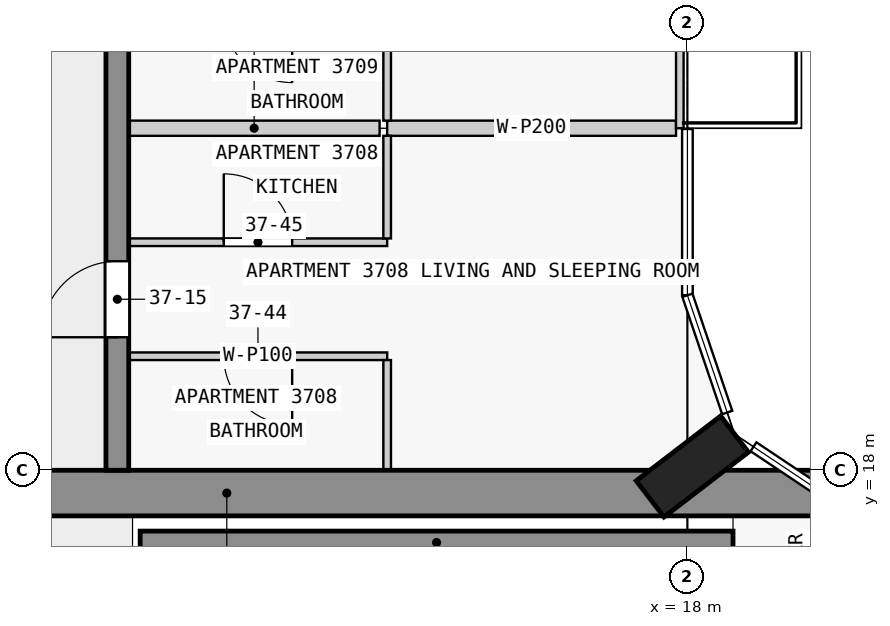
"""IFC4 building model, lengths in metres.
Left out: names, types, materials, properties, quantities, classifications, styles, units other than length and angle.
Written with IfcOpenShell. Run it as: python <this file> out.ifc"""

import sys

from ifc_helpers import new_model, si_unit, direction, frame, frame_2d, origin, origin_2d, place, context, subcontext, project, spatial, rectangle, extrude, element, fill, save


model = new_model("IFC4")
c1 = context("Model", 3, precision=1e-05, world=origin(), true_north=direction((0.0, 1.0)))
c2 = subcontext(c1, "Body", "Model", "MODEL_VIEW")
j1 = project(units=[si_unit("LENGTHUNIT", "METRE"), si_unit("PLANEANGLEUNIT", "RADIAN")], contexts=[c1])
p1 = place(None, origin())
s1 = spatial("IfcSite", under=j1, at=p1, CompositionType="ELEMENT")
p2 = place(p1, origin())
s2 = spatial("IfcBuilding", under=s1, at=p2, CompositionType="ELEMENT")
p3 = place(p2, frame((0.0, 0.0, 146.4)))
s3 = spatial("IfcBuildingStorey", under=s2, at=p3, CompositionType="ELEMENT", Elevation=146.4)
p4 = place(p3, frame((18.065, 18.05, 0.0), z_axis=(0.0, 0.0, 1.0), x_axis=(-0.608810846443, 0.793315418515, 0.0)))
e1 = element("IfcColumn", 1, at=p4, inside=s3, PredefinedType="COLUMN", context=c2, shape_type="SweptSolid", body=[
    extrude(rectangle(XDim=0.6, YDim=1.4, at=origin_2d()), origin(), (0.0, 0.0, 1.0), 3.5),
])
p5 = place(p3, frame((1.38, 17.7, 0.0), z_axis=(0.0, 0.0, 1.0), x_axis=(1.0, 0.0, 0.0)))
e2 = element("IfcWall", 2, at=p5, inside=s3, PredefinedType="SHEAR", context=c2, shape_type="SweptSolid", body=[
    extrude(rectangle(XDim=21.12, YDim=0.6, at=frame_2d((10.56, 0.0))), origin(), (0.0, 0.0, 1.0), 3.25),
])
p6 = place(p5, frame((6.4, 0.0, 0.0)))
e3 = element("IfcOpeningElement", 3, at=p6, cuts=e2, PredefinedType="OPENING", context=c2, shape_type="SweptSolid", body=[
    extrude(rectangle(XDim=1.8, YDim=2.1, at=frame_2d((0.9, 1.05))), frame((0.0, 0.31, 0.0), z_axis=(0.0, -1.0, 0.0), x_axis=(1.0, 0.0, 0.0)), (0.0, 0.0, 1.0), 0.62),
])
p7 = place(p3, frame((10.8, 17.05, 0.0), z_axis=(0.0, 0.0, 1.0), x_axis=(1.0, 0.0, 0.0)))
e4 = element("IfcWall", 4, at=p7, inside=s3, PredefinedType="SHEAR", context=c2, shape_type="SweptSolid", body=[
    extrude(rectangle(XDim=7.8, YDim=0.3, at=frame_2d((3.9, 0.0))), origin(), (0.0, 0.0, 1.0), 3.25),
])
p8 = place(p3, frame((10.5, 18.0, 0.0), z_axis=(0.0, 0.0, 1.0), x_axis=(0.0, 1.0, 0.0)))
e5 = element("IfcWall", 5, at=p8, inside=s3, PredefinedType="SHEAR", context=c2, shape_type="SweptSolid", body=[
    extrude(rectangle(XDim=27.0, YDim=0.3, at=frame_2d((13.5, 0.0))), origin(), (0.0, 0.0, 1.0), 3.25),
])
p9 = place(p8, frame((1.75, 0.0, 0.0)))
e6 = element("IfcOpeningElement", 6, at=p9, cuts=e5, PredefinedType="OPENING", context=c2, shape_type="SweptSolid", body=[
    extrude(rectangle(XDim=1.0, YDim=2.1, at=frame_2d((0.5, 1.05))), frame((0.0, 0.16, 0.0), z_axis=(0.0, -1.0, 0.0), x_axis=(1.0, 0.0, 0.0)), (0.0, 0.0, 1.0), 0.32),
])
p10 = place(p8, frame((6.25, 0.0, 0.0)))
e7 = element("IfcOpeningElement", 7, at=p10, cuts=e5, PredefinedType="OPENING", context=c2, shape_type="SweptSolid", body=[
    extrude(rectangle(XDim=1.0, YDim=2.1, at=frame_2d((0.5, 1.05))), frame((0.0, 0.16, 0.0), z_axis=(0.0, -1.0, 0.0), x_axis=(1.0, 0.0, 0.0)), (0.0, 0.0, 1.0), 0.32),
])
p11 = place(p8, frame((10.35, 0.0, 0.0)))
e8 = element("IfcOpeningElement", 8, at=p11, cuts=e5, PredefinedType="OPENING", context=c2, shape_type="SweptSolid", body=[
    extrude(rectangle(XDim=1.8, YDim=2.1, at=frame_2d((0.9, 1.05))), frame((0.0, 0.16, 0.0), z_axis=(0.0, -1.0, 0.0), x_axis=(1.0, 0.0, 0.0)), (0.0, 0.0, 1.0), 0.32),
])
p12 = place(p8, frame((15.25, 0.0, 0.0)))
e9 = element("IfcOpeningElement", 9, at=p12, cuts=e5, PredefinedType="OPENING", context=c2, shape_type="SweptSolid", body=[
    extrude(rectangle(XDim=1.0, YDim=2.1, at=frame_2d((0.5, 1.05))), frame((0.0, 0.16, 0.0), z_axis=(0.0, -1.0, 0.0), x_axis=(1.0, 0.0, 0.0)), (0.0, 0.0, 1.0), 0.32),
])
p13 = place(p8, frame((21.35, 0.0, 0.0)))
e10 = element("IfcOpeningElement", 10, at=p13, cuts=e5, PredefinedType="OPENING", context=c2, shape_type="SweptSolid", body=[
    extrude(rectangle(XDim=1.0, YDim=2.1, at=frame_2d((0.5, 1.05))), frame((0.0, 0.16, 0.0), z_axis=(0.0, -1.0, 0.0), x_axis=(1.0, 0.0, 0.0)), (0.0, 0.0, 1.0), 0.32),
])
p14 = place(p3, frame((17.9, 27.0, 0.0), z_axis=(0.0, 0.0, 1.0), x_axis=(0.0, -1.0, 0.0)))
e11 = element("IfcWall", 11, at=p14, inside=s3, PredefinedType="STANDARD", context=c2, shape_type="SweptSolid", body=[
    extrude(rectangle(XDim=4.5, YDim=0.1, at=frame_2d((2.25, 0.0))), origin(), (0.0, 0.0, 1.0), 3.25),
])
p15 = place(p14, frame((1.05, 0.0, 0.0)))
e12 = element("IfcOpeningElement", 12, at=p15, cuts=e11, PredefinedType="OPENING", context=c2, shape_type="SweptSolid", body=[
    extrude(rectangle(XDim=2.4, YDim=2.4, at=frame_2d((1.2, 1.2))), frame((0.0, 0.06, 0.0), z_axis=(0.0, -1.0, 0.0), x_axis=(1.0, 0.0, 0.0)), (0.0, 0.0, 1.0), 0.12),
])
p16 = place(p3, frame((14.05, 19.5, 0.0), z_axis=(0.0, 0.0, 1.0), x_axis=(-1.0, 0.0, 0.0)))
e13 = element("IfcWall", 13, at=p16, inside=s3, PredefinedType="PARTITIONING", context=c2, shape_type="SweptSolid", body=[
    extrude(rectangle(XDim=3.4, YDim=0.1, at=frame_2d((1.7, 0.0))), origin(), (0.0, 0.0, 1.0), 3.25),
])
p17 = place(p16, frame((1.25, 0.0, 0.0)))
e14 = element("IfcOpeningElement", 14, at=p17, cuts=e13, PredefinedType="OPENING", context=c2, shape_type="SweptSolid", body=[
    extrude(rectangle(XDim=0.9, YDim=2.1, at=frame_2d((0.45, 1.05))), frame((0.0, 0.06, 0.0), z_axis=(0.0, -1.0, 0.0), x_axis=(1.0, 0.0, 0.0)), (0.0, 0.0, 1.0), 0.12),
])
p18 = place(p3, frame((10.65, 21.0, 0.0), z_axis=(0.0, 0.0, 1.0), x_axis=(1.0, 0.0, 0.0)))
e15 = element("IfcWall", 15, at=p18, inside=s3, PredefinedType="PARTITIONING", context=c2, shape_type="SweptSolid", body=[
    extrude(rectangle(XDim=3.4, YDim=0.1, at=frame_2d((1.7, 0.0))), origin(), (0.0, 0.0, 1.0), 3.25),
])
p19 = place(p18, frame((1.25, 0.0, 0.0)))
e16 = element("IfcOpeningElement", 16, at=p19, cuts=e15, PredefinedType="OPENING", context=c2, shape_type="SweptSolid", body=[
    extrude(rectangle(XDim=0.9, YDim=2.1, at=frame_2d((0.45, 1.05))), frame((0.0, 0.06, 0.0), z_axis=(0.0, -1.0, 0.0), x_axis=(1.0, 0.0, 0.0)), (0.0, 0.0, 1.0), 0.12),
])
p20 = place(p3, frame((13.95, 22.5, 0.0), z_axis=(0.0, 0.0, 1.0), x_axis=(-1.0, 0.0, 0.0)))
e17 = element("IfcWall", 17, at=p20, inside=s3, PredefinedType="PARTITIONING", context=c2, shape_type="SweptSolid", body=[
    extrude(rectangle(XDim=3.3, YDim=0.2, at=frame_2d((1.65, 0.0))), origin(), (0.0, 0.0, 1.0), 3.25),
])
p21 = place(p3, frame((14.05, 22.5, 0.0), z_axis=(0.0, 0.0, 1.0), x_axis=(1.0, 0.0, 0.0)))
e18 = element("IfcWall", 18, at=p21, inside=s3, PredefinedType="PARTITIONING", context=c2, shape_type="SweptSolid", body=[
    extrude(rectangle(XDim=3.8, YDim=0.2, at=frame_2d((1.9, 0.0))), origin(), (0.0, 0.0, 1.0), 3.25),
])
p22 = place(p3, frame((14.05, 18.0, 0.0), z_axis=(0.0, 0.0, 1.0), x_axis=(0.0, 1.0, 0.0)))
e19 = element("IfcWall", 19, at=p22, inside=s3, PredefinedType="PARTITIONING", context=c2, shape_type="SweptSolid", body=[
    extrude(rectangle(XDim=1.45, YDim=0.1, at=frame_2d((0.725, 0.0))), origin(), (0.0, 0.0, 1.0), 3.25),
])
for number, where, z_axis, x_axis in (
    (20, (14.05, 21.05, 0.0), (0.0, 0.0, 1.0), (0.0, 1.0, 0.0)),
    (21, (14.05, 22.6, 0.0), (0.0, 0.0, 1.0), (0.0, 1.0, 0.0)),
):
    element("IfcWall", number, at=place(p3, frame(where, z_axis=z_axis, x_axis=x_axis)), inside=s3, PredefinedType="PARTITIONING", context=c2, shape_type="SweptSolid", body=[
        extrude(rectangle(XDim=1.35, YDim=0.1, at=frame_2d((0.675, 0.0))), origin(), (0.0, 0.0, 1.0), 3.25),
    ])
p23 = place(p9, origin())
e22 = element("IfcDoor", 22, at=p23, inside=s3, OperationType="SINGLE_SWING_LEFT", PredefinedType="DOOR", context=c2, shape_type="SweptSolid", body=[
    extrude(rectangle(XDim=1.0, YDim=2.1, at=frame_2d((0.5, 1.05))), frame((0.0, 0.025, 0.0), z_axis=(0.0, -1.0, 0.0), x_axis=(1.0, 0.0, 0.0)), (0.0, 0.0, 1.0), 0.05),
])
fill(e6, e22)
p24 = place(p17, origin())
e23 = element("IfcDoor", 23, at=p24, inside=s3, OperationType="SINGLE_SWING_LEFT", PredefinedType="DOOR", context=c2, shape_type="SweptSolid", body=[
    extrude(rectangle(XDim=0.9, YDim=2.1, at=frame_2d((0.45, 1.05))), frame((0.0, 0.025, 0.0), z_axis=(0.0, -1.0, 0.0), x_axis=(1.0, 0.0, 0.0)), (0.0, 0.0, 1.0), 0.05),
])
fill(e14, e23)
p25 = place(p19, origin())
e24 = element("IfcDoor", 24, at=p25, inside=s3, OperationType="SINGLE_SWING_LEFT", PredefinedType="DOOR", context=c2, shape_type="SweptSolid", body=[
    extrude(rectangle(XDim=0.9, YDim=2.1, at=frame_2d((0.45, 1.05))), frame((0.0, 0.025, 0.0), z_axis=(0.0, -1.0, 0.0), x_axis=(1.0, 0.0, 0.0)), (0.0, 0.0, 1.0), 0.05),
])
fill(e16, e24)
save(model, sys.argv[1])
